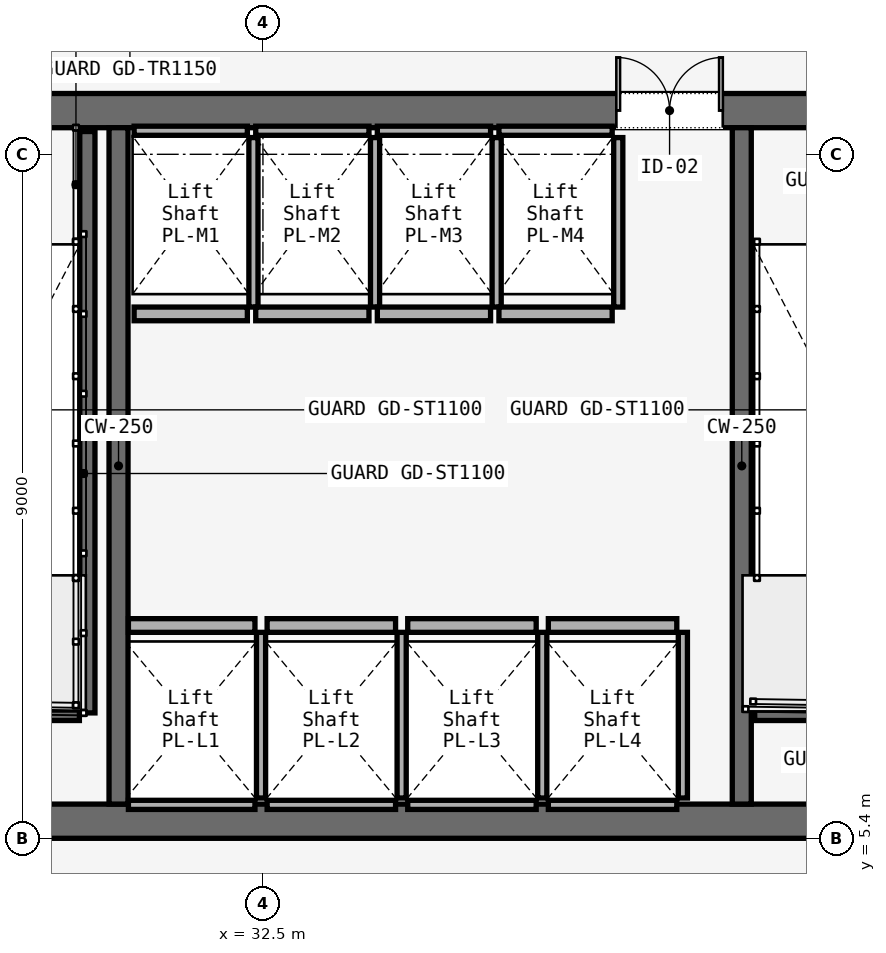
"""IFC4 building model, lengths in metres.
Left out: names, types, materials, properties, quantities, classifications, styles, units other than length and angle.
Written with IfcOpenShell. Run it as: python <this file> out.ifc"""

import sys

from ifc_helpers import new_model, si_unit, direction, frame, frame_2d, origin, place, context, subcontext, project, spatial, rectangle, extrude, element, fill, save


model = new_model("IFC4")
c1 = context("Model", 3, precision=1e-05, world=origin(), true_north=direction((0.0, 1.0)))
c2 = subcontext(c1, "Body", "Model", "MODEL_VIEW")
j1 = project(units=[si_unit("LENGTHUNIT", "METRE"), si_unit("PLANEANGLEUNIT", "RADIAN")], contexts=[c1])
p1 = place(None, origin())
s1 = spatial("IfcSite", under=j1, at=p1, CompositionType="ELEMENT")
p2 = place(p1, origin())
s2 = spatial("IfcBuilding", under=s1, at=p2, CompositionType="ELEMENT")
p3 = place(p2, frame((0.0, 0.0, 18.0)))
s3 = spatial("IfcBuildingStorey", under=s2, at=p3, CompositionType="ELEMENT", Elevation=18.0)
p4 = place(p3, frame((26.45, 14.975, 0.0), z_axis=(0.0, 0.0, 1.0), x_axis=(1.0, 0.0, 0.0)))
e1 = element("IfcWall", 1, at=p4, inside=s3, PredefinedType="SOLIDWALL", context=c2, shape_type="SweptSolid", body=[
    extrude(rectangle(XDim=31.1, YDim=0.45, at=frame_2d((15.55, 0.0))), origin(), (0.0, 0.0, 1.0), 5.7),
])
p5 = place(p4, frame((1.65, 0.0, 0.0)))
e2 = element("IfcOpeningElement", 2, at=p5, cuts=e1, PredefinedType="OPENING", context=c2, shape_type="SweptSolid", body=[
    extrude(rectangle(XDim=1.1, YDim=2.2, at=frame_2d((0.55, 1.1))), frame((0.0, 0.225, 0.0), z_axis=(0.0, -1.0, 0.0), x_axis=(1.0, 0.0, 0.0)), (0.0, 0.0, 1.0), 0.45),
])
p6 = place(p4, frame((13.65, 0.0, 0.0)))
e3 = element("IfcOpeningElement", 3, at=p6, cuts=e1, PredefinedType="OPENING", context=c2, shape_type="SweptSolid", body=[
    extrude(rectangle(XDim=1.1, YDim=2.2, at=frame_2d((0.55, 1.1))), frame((0.0, 0.225, 0.0), z_axis=(0.0, -1.0, 0.0), x_axis=(1.0, 0.0, 0.0)), (0.0, 0.0, 1.0), 0.45),
])
p7 = place(p4, frame((25.55, 0.0, 0.0)))
e4 = element("IfcOpeningElement", 4, at=p7, cuts=e1, PredefinedType="OPENING", context=c2, shape_type="SweptSolid", body=[
    extrude(rectangle(XDim=1.1, YDim=2.2, at=frame_2d((0.55, 1.1))), frame((0.0, 0.225, 0.0), z_axis=(0.0, -1.0, 0.0), x_axis=(1.0, 0.0, 0.0)), (0.0, 0.0, 1.0), 0.45),
])
p8 = place(p4, frame((10.7, 0.0, 0.0)))
e5 = element("IfcOpeningElement", 5, at=p8, cuts=e1, PredefinedType="OPENING", context=c2, shape_type="SweptSolid", body=[
    extrude(rectangle(XDim=1.4, YDim=2.2, at=frame_2d((0.7, 1.1))), frame((0.0, 0.225, 0.0), z_axis=(0.0, -1.0, 0.0), x_axis=(1.0, 0.0, 0.0)), (0.0, 0.0, 1.0), 0.45),
])
p9 = place(p4, frame((19.35, 0.0, 0.0)))
e6 = element("IfcOpeningElement", 6, at=p9, cuts=e1, PredefinedType="OPENING", context=c2, shape_type="SweptSolid", body=[
    extrude(rectangle(XDim=1.1, YDim=2.2, at=frame_2d((0.55, 1.1))), frame((0.0, 0.225, 0.0), z_axis=(0.0, -1.0, 0.0), x_axis=(1.0, 0.0, 0.0)), (0.0, 0.0, 1.0), 0.45),
])
p10 = place(p4, frame((21.4, 0.0, 0.0)))
e7 = element("IfcOpeningElement", 7, at=p10, cuts=e1, PredefinedType="OPENING", context=c2, shape_type="SweptSolid", body=[
    extrude(rectangle(XDim=0.9, YDim=2.1, at=frame_2d((0.45, 1.05))), frame((0.0, 0.225, 0.0), z_axis=(0.0, -1.0, 0.0), x_axis=(1.0, 0.0, 0.0)), (0.0, 0.0, 1.0), 0.45),
])
p11 = place(p4, frame((23.35, 0.0, 0.0)))
e8 = element("IfcOpeningElement", 8, at=p11, cuts=e1, PredefinedType="OPENING", context=c2, shape_type="SweptSolid", body=[
    extrude(rectangle(XDim=1.3, YDim=2.3, at=frame_2d((0.65, 1.15))), frame((0.0, 0.225, 0.0), z_axis=(0.0, -1.0, 0.0), x_axis=(1.0, 0.0, 0.0)), (0.0, 0.0, 1.0), 0.45),
])
p12 = place(p3, frame((26.45, 5.625, 0.0), z_axis=(0.0, 0.0, 1.0), x_axis=(1.0, 0.0, 0.0)))
e9 = element("IfcWall", 9, at=p12, inside=s3, PredefinedType="SOLIDWALL", context=c2, shape_type="SweptSolid", body=[
    extrude(rectangle(XDim=31.1, YDim=0.45, at=frame_2d((15.55, 0.0))), origin(), (0.0, 0.0, 1.0), 5.7),
])
for number, where, z_axis, x_axis in (
    (10, (30.6, 5.85, 0.0), (0.0, 0.0, 1.0), (0.0, 1.0, 0.0)),
    (11, (38.8, 5.85, 0.0), (0.0, 0.0, 1.0), (0.0, 1.0, 0.0)),
):
    element("IfcWall", number, at=place(p3, frame(where, z_axis=z_axis, x_axis=x_axis)), inside=s3, PredefinedType="SOLIDWALL", context=c2, shape_type="SweptSolid", body=[
        extrude(rectangle(XDim=8.9, YDim=0.25, at=frame_2d((4.45, 0.0))), origin(), (0.0, 0.0, 1.0), 5.7),
    ])
p13 = place(p3, frame((30.19, 14.7, 0.0), z_axis=(0.0, 0.0, 1.0), x_axis=(0.0, -1.0, 0.0)))
e12 = element("IfcWall", 12, at=p13, inside=s3, PredefinedType="SOLIDWALL", context=c2, shape_type="SweptSolid", body=[
    extrude(rectangle(XDim=7.65, YDim=0.2, at=frame_2d((3.825, 0.0))), origin(), (0.0, 0.0, 1.0), 6.0),
])
for number, where, z_axis, x_axis in (
    (13, (26.97, 7.05, 0.0), (0.0, 0.0, 1.0), (1.0, 0.0, 0.0)),
    (14, (38.97, 7.05, 0.0), (0.0, 0.0, 1.0), (1.0, 0.0, 0.0)),
):
    element("IfcWall", number, at=place(p3, frame(where, z_axis=z_axis, x_axis=x_axis)), inside=s3, PredefinedType="SOLIDWALL", context=c2, shape_type="SweptSolid", body=[
        extrude(rectangle(XDim=3.115, YDim=0.2, at=frame_2d((1.558, 0.0))), origin(), (0.0, 0.0, 1.0), 6.0),
    ])
p14 = place(p3, frame((30.73, 8.2, 0.0), z_axis=(0.0, 0.0, 1.0), x_axis=(1.0, 0.0, 0.0)))
e15 = element("IfcWall", 15, at=p14, inside=s3, PredefinedType="SOLIDWALL", context=c2, shape_type="SweptSolid", body=[
    extrude(rectangle(XDim=1.665, YDim=0.18, at=frame_2d((0.833, 0.0))), origin(), (0.0, 0.0, 1.0), 4.47),
])
p15 = place(p3, frame((30.73, 5.84, 0.0), z_axis=(0.0, 0.0, 1.0), x_axis=(1.0, 0.0, 0.0)))
e16 = element("IfcWall", 16, at=p15, inside=s3, PredefinedType="SOLIDWALL", context=c2, shape_type="SweptSolid", body=[
    extrude(rectangle(XDim=1.665, YDim=0.12, at=frame_2d((0.833, 0.0))), origin(), (0.0, 0.0, 1.0), 4.47),
])
p16 = place(p3, frame((32.475, 5.93, 0.0), z_axis=(0.0, 0.0, 1.0), x_axis=(0.0, 1.0, 0.0)))
e17 = element("IfcWall", 17, at=p16, inside=s3, PredefinedType="SOLIDWALL", context=c2, shape_type="SweptSolid", body=[
    extrude(rectangle(XDim=2.18, YDim=0.12, at=frame_2d((1.09, 0.0))), origin(), (0.0, 0.0, 1.0), 4.47),
])
p17 = place(p3, frame((32.555, 8.2, 0.0), z_axis=(0.0, 0.0, 1.0), x_axis=(1.0, 0.0, 0.0)))
e18 = element("IfcWall", 18, at=p17, inside=s3, PredefinedType="SOLIDWALL", context=c2, shape_type="SweptSolid", body=[
    extrude(rectangle(XDim=1.69, YDim=0.18, at=frame_2d((0.845, 0.0))), origin(), (0.0, 0.0, 1.0), 4.47),
])
p18 = place(p3, frame((32.555, 5.84, 0.0), z_axis=(0.0, 0.0, 1.0), x_axis=(1.0, 0.0, 0.0)))
e19 = element("IfcWall", 19, at=p18, inside=s3, PredefinedType="SOLIDWALL", context=c2, shape_type="SweptSolid", body=[
    extrude(rectangle(XDim=1.69, YDim=0.12, at=frame_2d((0.845, 0.0))), origin(), (0.0, 0.0, 1.0), 4.47),
])
p19 = place(p3, frame((34.325, 5.93, 0.0), z_axis=(0.0, 0.0, 1.0), x_axis=(0.0, 1.0, 0.0)))
e20 = element("IfcWall", 20, at=p19, inside=s3, PredefinedType="SOLIDWALL", context=c2, shape_type="SweptSolid", body=[
    extrude(rectangle(XDim=2.18, YDim=0.12, at=frame_2d((1.09, 0.0))), origin(), (0.0, 0.0, 1.0), 4.47),
])
p20 = place(p3, frame((34.405, 8.2, 0.0), z_axis=(0.0, 0.0, 1.0), x_axis=(1.0, 0.0, 0.0)))
e21 = element("IfcWall", 21, at=p20, inside=s3, PredefinedType="SOLIDWALL", context=c2, shape_type="SweptSolid", body=[
    extrude(rectangle(XDim=1.69, YDim=0.18, at=frame_2d((0.845, 0.0))), origin(), (0.0, 0.0, 1.0), 4.47),
])
p21 = place(p3, frame((34.405, 5.84, 0.0), z_axis=(0.0, 0.0, 1.0), x_axis=(1.0, 0.0, 0.0)))
e22 = element("IfcWall", 22, at=p21, inside=s3, PredefinedType="SOLIDWALL", context=c2, shape_type="SweptSolid", body=[
    extrude(rectangle(XDim=1.69, YDim=0.12, at=frame_2d((0.845, 0.0))), origin(), (0.0, 0.0, 1.0), 4.47),
])
p22 = place(p3, frame((36.175, 5.93, 0.0), z_axis=(0.0, 0.0, 1.0), x_axis=(0.0, 1.0, 0.0)))
e23 = element("IfcWall", 23, at=p22, inside=s3, PredefinedType="SOLIDWALL", context=c2, shape_type="SweptSolid", body=[
    extrude(rectangle(XDim=2.18, YDim=0.12, at=frame_2d((1.09, 0.0))), origin(), (0.0, 0.0, 1.0), 4.47),
])
p23 = place(p3, frame((36.255, 8.2, 0.0), z_axis=(0.0, 0.0, 1.0), x_axis=(1.0, 0.0, 0.0)))
e24 = element("IfcWall", 24, at=p23, inside=s3, PredefinedType="SOLIDWALL", context=c2, shape_type="SweptSolid", body=[
    extrude(rectangle(XDim=1.69, YDim=0.18, at=frame_2d((0.845, 0.0))), origin(), (0.0, 0.0, 1.0), 4.47),
])
p24 = place(p3, frame((36.255, 5.84, 0.0), z_axis=(0.0, 0.0, 1.0), x_axis=(1.0, 0.0, 0.0)))
e25 = element("IfcWall", 25, at=p24, inside=s3, PredefinedType="SOLIDWALL", context=c2, shape_type="SweptSolid", body=[
    extrude(rectangle(XDim=1.69, YDim=0.12, at=frame_2d((0.845, 0.0))), origin(), (0.0, 0.0, 1.0), 4.47),
])
p25 = place(p3, frame((38.025, 5.93, 0.0), z_axis=(0.0, 0.0, 1.0), x_axis=(0.0, 1.0, 0.0)))
e26 = element("IfcWall", 26, at=p25, inside=s3, PredefinedType="SOLIDWALL", context=c2, shape_type="SweptSolid", body=[
    extrude(rectangle(XDim=2.18, YDim=0.12, at=frame_2d((1.09, 0.0))), origin(), (0.0, 0.0, 1.0), 4.47),
])
p26 = place(p3, frame((30.805, 12.3, 0.0), z_axis=(0.0, 0.0, 1.0), x_axis=(1.0, 0.0, 0.0)))
e27 = element("IfcWall", 27, at=p26, inside=s3, PredefinedType="SOLIDWALL", context=c2, shape_type="SweptSolid", body=[
    extrude(rectangle(XDim=1.49, YDim=0.18, at=frame_2d((0.745, 0.0))), origin(), (0.0, 0.0, 1.0), 4.47),
])
p27 = place(p3, frame((30.805, 14.71, 0.0), z_axis=(0.0, 0.0, 1.0), x_axis=(1.0, 0.0, 0.0)))
e28 = element("IfcWall", 28, at=p27, inside=s3, PredefinedType="SOLIDWALL", context=c2, shape_type="SweptSolid", body=[
    extrude(rectangle(XDim=1.49, YDim=0.12, at=frame_2d((0.745, 0.0))), origin(), (0.0, 0.0, 1.0), 4.47),
])
p28 = place(p3, frame((32.375, 12.39, 0.0), z_axis=(0.0, 0.0, 1.0), x_axis=(0.0, 1.0, 0.0)))
e29 = element("IfcWall", 29, at=p28, inside=s3, PredefinedType="SOLIDWALL", context=c2, shape_type="SweptSolid", body=[
    extrude(rectangle(XDim=2.23, YDim=0.12, at=frame_2d((1.115, 0.0))), origin(), (0.0, 0.0, 1.0), 4.47),
])
p29 = place(p3, frame((32.405, 12.3, 0.0), z_axis=(0.0, 0.0, 1.0), x_axis=(1.0, 0.0, 0.0)))
e30 = element("IfcWall", 30, at=p29, inside=s3, PredefinedType="SOLIDWALL", context=c2, shape_type="SweptSolid", body=[
    extrude(rectangle(XDim=1.49, YDim=0.18, at=frame_2d((0.745, 0.0))), origin(), (0.0, 0.0, 1.0), 4.47),
])
p30 = place(p3, frame((32.405, 14.71, 0.0), z_axis=(0.0, 0.0, 1.0), x_axis=(1.0, 0.0, 0.0)))
e31 = element("IfcWall", 31, at=p30, inside=s3, PredefinedType="SOLIDWALL", context=c2, shape_type="SweptSolid", body=[
    extrude(rectangle(XDim=1.49, YDim=0.12, at=frame_2d((0.745, 0.0))), origin(), (0.0, 0.0, 1.0), 4.47),
])
p31 = place(p3, frame((33.975, 12.39, 0.0), z_axis=(0.0, 0.0, 1.0), x_axis=(0.0, 1.0, 0.0)))
e32 = element("IfcWall", 32, at=p31, inside=s3, PredefinedType="SOLIDWALL", context=c2, shape_type="SweptSolid", body=[
    extrude(rectangle(XDim=2.23, YDim=0.12, at=frame_2d((1.115, 0.0))), origin(), (0.0, 0.0, 1.0), 4.47),
])
p32 = place(p3, frame((34.005, 12.3, 0.0), z_axis=(0.0, 0.0, 1.0), x_axis=(1.0, 0.0, 0.0)))
e33 = element("IfcWall", 33, at=p32, inside=s3, PredefinedType="SOLIDWALL", context=c2, shape_type="SweptSolid", body=[
    extrude(rectangle(XDim=1.49, YDim=0.18, at=frame_2d((0.745, 0.0))), origin(), (0.0, 0.0, 1.0), 4.47),
])
p33 = place(p3, frame((34.005, 14.71, 0.0), z_axis=(0.0, 0.0, 1.0), x_axis=(1.0, 0.0, 0.0)))
e34 = element("IfcWall", 34, at=p33, inside=s3, PredefinedType="SOLIDWALL", context=c2, shape_type="SweptSolid", body=[
    extrude(rectangle(XDim=1.49, YDim=0.12, at=frame_2d((0.745, 0.0))), origin(), (0.0, 0.0, 1.0), 4.47),
])
p34 = place(p3, frame((35.575, 12.39, 0.0), z_axis=(0.0, 0.0, 1.0), x_axis=(0.0, 1.0, 0.0)))
e35 = element("IfcWall", 35, at=p34, inside=s3, PredefinedType="SOLIDWALL", context=c2, shape_type="SweptSolid", body=[
    extrude(rectangle(XDim=2.23, YDim=0.12, at=frame_2d((1.115, 0.0))), origin(), (0.0, 0.0, 1.0), 4.47),
])
p35 = place(p3, frame((35.605, 12.3, 0.0), z_axis=(0.0, 0.0, 1.0), x_axis=(1.0, 0.0, 0.0)))
e36 = element("IfcWall", 36, at=p35, inside=s3, PredefinedType="SOLIDWALL", context=c2, shape_type="SweptSolid", body=[
    extrude(rectangle(XDim=1.49, YDim=0.18, at=frame_2d((0.745, 0.0))), origin(), (0.0, 0.0, 1.0), 4.47),
])
p36 = place(p3, frame((35.605, 14.71, 0.0), z_axis=(0.0, 0.0, 1.0), x_axis=(1.0, 0.0, 0.0)))
e37 = element("IfcWall", 37, at=p36, inside=s3, PredefinedType="SOLIDWALL", context=c2, shape_type="SweptSolid", body=[
    extrude(rectangle(XDim=1.49, YDim=0.12, at=frame_2d((0.745, 0.0))), origin(), (0.0, 0.0, 1.0), 4.47),
])
p37 = place(p3, frame((37.175, 12.39, 0.0), z_axis=(0.0, 0.0, 1.0), x_axis=(0.0, 1.0, 0.0)))
e38 = element("IfcWall", 38, at=p37, inside=s3, PredefinedType="SOLIDWALL", context=c2, shape_type="SweptSolid", body=[
    extrude(rectangle(XDim=2.23, YDim=0.12, at=frame_2d((1.115, 0.0))), origin(), (0.0, 0.0, 1.0), 4.47),
])
p38 = place(p8, origin())
e39 = element("IfcDoor", 39, at=p38, inside=s3, OperationType="DOUBLE_DOOR_SINGLE_SWING", PredefinedType="DOOR", context=c2, shape_type="SweptSolid", body=[
    extrude(rectangle(XDim=1.4, YDim=2.2, at=frame_2d((0.7, 1.1))), frame((0.0, 0.025, 0.0), z_axis=(0.0, -1.0, 0.0), x_axis=(1.0, 0.0, 0.0)), (0.0, 0.0, 1.0), 0.05),
])
fill(e5, e39)
save(model, sys.argv[1])
